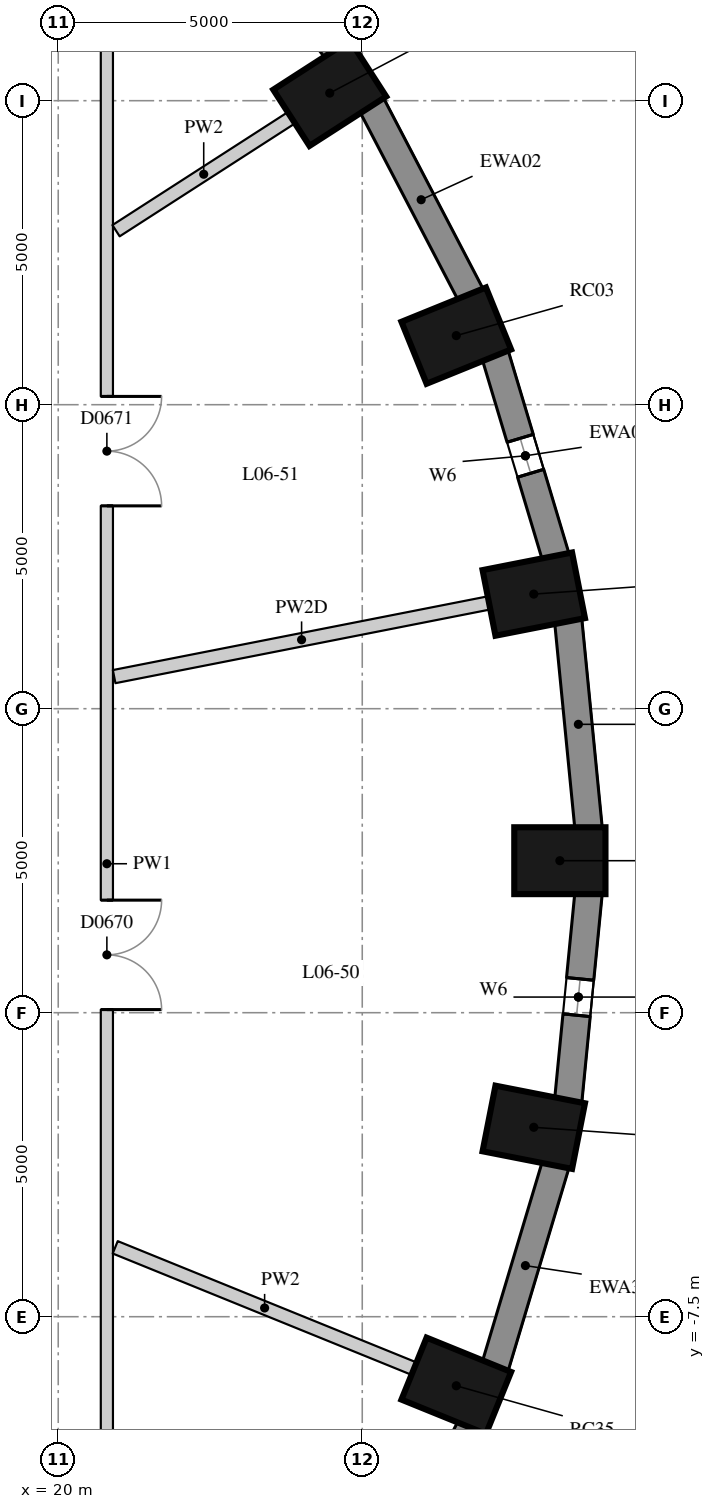
"""IFC4 building model, lengths in metres.
Left out: names, types, materials, properties, quantities, classifications, styles, units other than length and angle.
Written with IfcOpenShell. Run it as: python <this file> out.ifc"""

import sys

from ifc_helpers import new_model, si_unit, direction, frame, frame_2d, origin, origin_2d, place, context, subcontext, project, spatial, rectangle, extrude, element, fill, save


model = new_model("IFC4")
c1 = context("Model", 3, precision=1e-05, world=origin(), true_north=direction((0.0, 1.0)))
c2 = subcontext(c1, "Body", "Model", "MODEL_VIEW")
j1 = project(units=[si_unit("LENGTHUNIT", "METRE"), si_unit("PLANEANGLEUNIT", "RADIAN")], contexts=[c1])
p1 = place(None, origin())
s1 = spatial("IfcSite", under=j1, at=p1, CompositionType="ELEMENT")
p2 = place(p1, origin())
s2 = spatial("IfcBuilding", under=s1, at=p2, CompositionType="ELEMENT")
p3 = place(p2, frame((0.0, 0.0, 28.3)))
s3 = spatial("IfcBuildingStorey", under=s2, at=p3, CompositionType="ELEMENT", Elevation=28.3)
for number, where, z_axis, x_axis in (
    (1, (28.25, 0.0, 0.0), (0.0, 0.0, 1.0), (1.0, 0.0, 0.0)),
    (2, (27.821, 4.385, 0.0), (0.0, 0.0, 1.0), (0.981, 0.193, 0.0)),
    (3, (26.546, 8.636, 0.0), (0.0, 0.0, 1.0), (0.927, 0.376, 0.0)),
    (4, (24.465, 12.625, 0.0), (0.0, 0.0, 1.0), (0.841, 0.541, 0.0)),
    (5, (26.546, -8.636, 0.0), (0.0, 0.0, 1.0), (0.927, -0.376, 0.0)),
    (6, (27.821, -4.385, 0.0), (0.0, 0.0, 1.0), (0.981, -0.193, 0.0)),
):
    element("IfcColumn", number, at=place(p3, frame(where, z_axis=z_axis, x_axis=x_axis)), inside=s3, PredefinedType="COLUMN", context=c2, shape_type="SweptSolid", body=[
        extrude(rectangle(XDim=1.5, YDim=1.1, at=origin_2d()), origin(), (0.0, 0.0, 1.0), 3.3),
    ])
p4 = place(p3, frame((28.722, 0.53, 0.0), z_axis=(0.0, 0.0, 1.0), x_axis=(-0.097389581596, 0.995246336038, 0.0)))
e7 = element("IfcWall", 7, at=p4, inside=s3, PredefinedType="SOLIDWALL", context=c2, shape_type="SweptSolid", body=[
    extrude(rectangle(XDim=3.442, YDim=0.45, at=frame_2d((1.721, 0.0))), origin(), (0.0, 0.0, 1.0), 3.02),
])
p5 = place(p3, frame((28.182, 4.996, 0.0), z_axis=(0.0, 0.0, 1.0), x_axis=(-0.287064133733, 0.957911364963, 0.0)))
e8 = element("IfcWall", 8, at=p5, inside=s3, PredefinedType="SOLIDWALL", context=c2, shape_type="SweptSolid", body=[
    extrude(rectangle(XDim=3.473, YDim=0.45, at=frame_2d((1.737, 0.0))), origin(), (0.0, 0.0, 1.0), 3.02),
])
p6 = place(p5, frame((1.437, 0.0, 0.4)))
e9 = element("IfcOpeningElement", 9, at=p6, cuts=e8, PredefinedType="OPENING", context=c2, shape_type="SweptSolid", body=[
    extrude(rectangle(XDim=0.6, YDim=1.75, at=frame_2d((0.3, 0.875))), frame((0.0, 0.235, 0.0), z_axis=(0.0, -1.0, 0.0), x_axis=(1.0, 0.0, 0.0)), (0.0, 0.0, 1.0), 0.47),
])
p7 = place(p3, frame((26.786, 9.305, 0.0), z_axis=(0.0, 0.0, 1.0), x_axis=(-0.462492775226, 0.886623050041, 0.0)))
e10 = element("IfcWall", 10, at=p7, inside=s3, PredefinedType="SOLIDWALL", context=c2, shape_type="SweptSolid", body=[
    extrude(rectangle(XDim=3.532, YDim=0.45, at=frame_2d((1.766, 0.0))), origin(), (0.0, 0.0, 1.0), 3.02),
])
p8 = place(p3, frame((24.578, 13.328, 0.0), z_axis=(0.0, 0.0, 1.0), x_axis=(-0.616661975264, 0.787228053529, 0.0)))
e11 = element("IfcWall", 11, at=p8, inside=s3, PredefinedType="SOLIDWALL", context=c2, shape_type="SweptSolid", body=[
    extrude(rectangle(XDim=3.61, YDim=0.45, at=frame_2d((1.805, 0.0))), origin(), (0.0, 0.0, 1.0), 3.02),
])
p9 = place(p8, frame((1.505, 0.0, 0.4)))
e12 = element("IfcOpeningElement", 12, at=p9, cuts=e11, PredefinedType="OPENING", context=c2, shape_type="SweptSolid", body=[
    extrude(rectangle(XDim=0.6, YDim=1.75, at=frame_2d((0.3, 0.875))), frame((0.0, 0.235, 0.0), z_axis=(0.0, -1.0, 0.0), x_axis=(1.0, 0.0, 0.0)), (0.0, 0.0, 1.0), 0.47),
])
p10 = place(p3, frame((25.152, -12.437, 0.0), z_axis=(0.0, 0.0, 1.0), x_axis=(0.462492775226, 0.886623050041, 0.0)))
e13 = element("IfcWall", 13, at=p10, inside=s3, PredefinedType="SOLIDWALL", context=c2, shape_type="SweptSolid", body=[
    extrude(rectangle(XDim=3.532, YDim=0.45, at=frame_2d((1.766, 0.0))), origin(), (0.0, 0.0, 1.0), 3.02),
])
p11 = place(p10, frame((1.466, 0.0, 0.4)))
e14 = element("IfcOpeningElement", 14, at=p11, cuts=e13, PredefinedType="OPENING", context=c2, shape_type="SweptSolid", body=[
    extrude(rectangle(XDim=0.6, YDim=1.75, at=frame_2d((0.3, 0.875))), frame((0.0, 0.235, 0.0), z_axis=(0.0, -1.0, 0.0), x_axis=(1.0, 0.0, 0.0)), (0.0, 0.0, 1.0), 0.47),
])
p12 = place(p3, frame((27.185, -8.323, 0.0), z_axis=(0.0, 0.0, 1.0), x_axis=(0.287064133733, 0.957911364963, 0.0)))
e15 = element("IfcWall", 15, at=p12, inside=s3, PredefinedType="SOLIDWALL", context=c2, shape_type="SweptSolid", body=[
    extrude(rectangle(XDim=3.473, YDim=0.45, at=frame_2d((1.737, 0.0))), origin(), (0.0, 0.0, 1.0), 3.02),
])
p13 = place(p3, frame((28.387, -3.956, 0.0), z_axis=(0.0, 0.0, 1.0), x_axis=(0.097389581596, 0.995246336038, 0.0)))
e16 = element("IfcWall", 16, at=p13, inside=s3, PredefinedType="SOLIDWALL", context=c2, shape_type="SweptSolid", body=[
    extrude(rectangle(XDim=3.442, YDim=0.45, at=frame_2d((1.721, 0.0))), origin(), (0.0, 0.0, 1.0), 3.02),
])
p14 = place(p13, frame((1.421, 0.0, 0.4)))
e17 = element("IfcOpeningElement", 17, at=p14, cuts=e16, PredefinedType="OPENING", context=c2, shape_type="SweptSolid", body=[
    extrude(rectangle(XDim=0.6, YDim=1.75, at=frame_2d((0.3, 0.875))), frame((0.0, 0.235, 0.0), z_axis=(0.0, -1.0, 0.0), x_axis=(1.0, 0.0, 0.0)), (0.0, 0.0, 1.0), 0.47),
])
p15 = place(p3, frame((20.8, 13.5, 0.0), z_axis=(0.0, 0.0, 1.0), x_axis=(0.0, -1.0, 0.0)))
e18 = element("IfcWall", 18, at=p15, inside=s3, PredefinedType="PARTITIONING", context=c2, shape_type="SweptSolid", body=[
    extrude(rectangle(XDim=27.1, YDim=0.2, at=frame_2d((13.55, 0.0))), origin(), (0.0, 0.0, 1.0), 3.02),
])
p16 = place(p15, frame((14.149, 0.0, 0.0)))
e19 = element("IfcOpeningElement", 19, at=p16, cuts=e18, PredefinedType="OPENING", context=c2, shape_type="SweptSolid", body=[
    extrude(rectangle(XDim=1.8, YDim=2.1, at=frame_2d((0.9, 1.05))), frame((0.0, 0.11, 0.0), z_axis=(0.0, -1.0, 0.0), x_axis=(1.0, 0.0, 0.0)), (0.0, 0.0, 1.0), 0.22),
])
p17 = place(p15, frame((5.864, 0.0, 0.0)))
e20 = element("IfcOpeningElement", 20, at=p17, cuts=e18, PredefinedType="OPENING", context=c2, shape_type="SweptSolid", body=[
    extrude(rectangle(XDim=1.8, YDim=2.1, at=frame_2d((0.9, 1.05))), frame((0.0, 0.11, 0.0), z_axis=(0.0, -1.0, 0.0), x_axis=(1.0, 0.0, 0.0)), (0.0, 0.0, 1.0), 0.22),
])
p18 = place(p3, frame((27.085, 4.24, 0.0), z_axis=(0.0, 0.0, 1.0), x_axis=(-0.981207724218, -0.192954403772, 0.0)))
e21 = element("IfcWall", 21, at=p18, inside=s3, PredefinedType="PARTITIONING", context=c2, shape_type="SweptSolid", body=[
    extrude(rectangle(XDim=6.283, YDim=0.22, at=frame_2d((3.142, 0.0))), origin(), (0.0, 0.0, 1.0), 2.47),
])
p19 = place(p3, frame((23.835, 12.219, 0.0), z_axis=(0.0, 0.0, 1.0), x_axis=(-0.840694872373, -0.541509124176, 0.0)))
e22 = element("IfcWall", 22, at=p19, inside=s3, PredefinedType="PARTITIONING", context=c2, shape_type="SweptSolid", body=[
    extrude(rectangle(XDim=3.43, YDim=0.22, at=frame_2d((1.715, 0.0))), origin(), (0.0, 0.0, 1.0), 3.02),
])
p20 = place(p3, frame((25.851, -8.354, 0.0), z_axis=(0.0, 0.0, 1.0), x_axis=(-0.926546814299, 0.376179479653, 0.0)))
e23 = element("IfcWall", 23, at=p20, inside=s3, PredefinedType="PARTITIONING", context=c2, shape_type="SweptSolid", body=[
    extrude(rectangle(XDim=5.304, YDim=0.22, at=frame_2d((2.652, 0.0))), origin(), (0.0, 0.0, 1.0), 3.02),
])
p21 = place(p6, origin())
e24 = element("IfcWindow", 24, at=p21, inside=s3, PartitioningType="SINGLE_PANEL", PredefinedType="WINDOW", context=c2, shape_type="SweptSolid", body=[
    extrude(rectangle(XDim=0.6, YDim=1.75, at=frame_2d((0.3, 0.875))), frame((0.0, 0.035, 0.0), z_axis=(0.0, -1.0, 0.0), x_axis=(1.0, 0.0, 0.0)), (0.0, 0.0, 1.0), 0.06),
])
fill(e9, e24)
p22 = place(p14, origin())
e25 = element("IfcWindow", 25, at=p22, inside=s3, PartitioningType="SINGLE_PANEL", PredefinedType="WINDOW", context=c2, shape_type="SweptSolid", body=[
    extrude(rectangle(XDim=0.6, YDim=1.75, at=frame_2d((0.3, 0.875))), frame((0.0, 0.035, 0.0), z_axis=(0.0, -1.0, 0.0), x_axis=(1.0, 0.0, 0.0)), (0.0, 0.0, 1.0), 0.06),
])
fill(e17, e25)
p23 = place(p16, origin())
e26 = element("IfcDoor", 26, at=p23, inside=s3, OperationType="DOUBLE_DOOR_SINGLE_SWING", PredefinedType="DOOR", context=c2, shape_type="SweptSolid", body=[
    extrude(rectangle(XDim=1.8, YDim=2.1, at=frame_2d((0.9, 1.05))), frame((0.0, 0.025, 0.0), z_axis=(0.0, -1.0, 0.0), x_axis=(1.0, 0.0, 0.0)), (0.0, 0.0, 1.0), 0.05),
])
fill(e19, e26)
p24 = place(p17, origin())
e27 = element("IfcDoor", 27, at=p24, inside=s3, OperationType="DOUBLE_DOOR_SINGLE_SWING", PredefinedType="DOOR", context=c2, shape_type="SweptSolid", body=[
    extrude(rectangle(XDim=1.8, YDim=2.1, at=frame_2d((0.9, 1.05))), frame((0.0, 0.025, 0.0), z_axis=(0.0, -1.0, 0.0), x_axis=(1.0, 0.0, 0.0)), (0.0, 0.0, 1.0), 0.05),
])
fill(e20, e27)
save(model, sys.argv[1])
